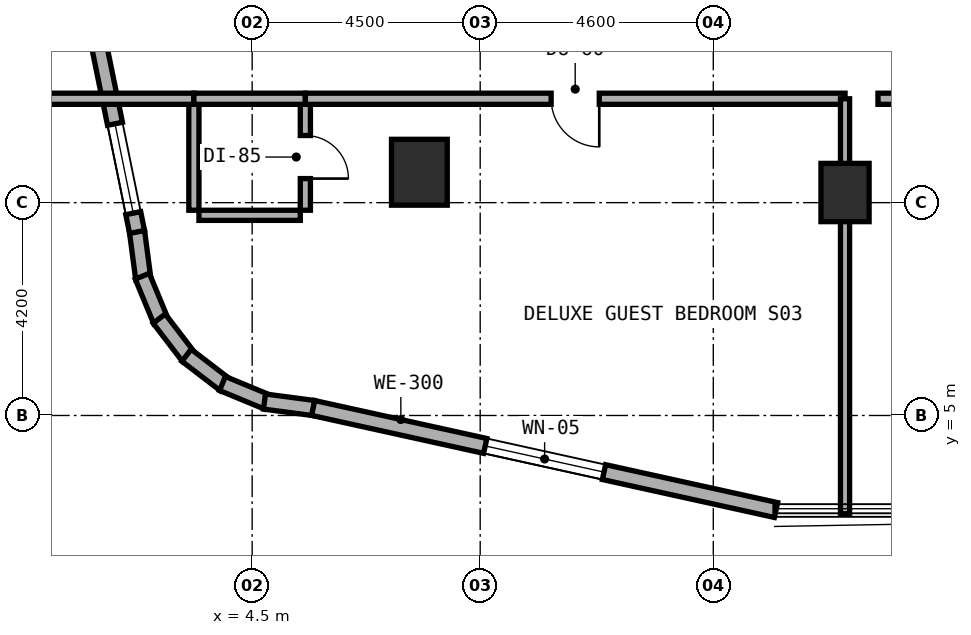
"""IFC4 building model, lengths in metres.
Left out: names, types, materials, properties, quantities, classifications, styles, units other than length and angle.
Written with IfcOpenShell. Run it as: python <this file> out.ifc"""

import sys

from ifc_helpers import new_model, si_unit, direction, frame, frame_2d, origin, origin_2d, place, context, subcontext, project, spatial, rectangle, extrude, element, fill, save


model = new_model("IFC4")
c1 = context("Model", 3, precision=1e-05, world=origin(), true_north=direction((0.0, 1.0)))
c2 = subcontext(c1, "Body", "Model", "MODEL_VIEW")
j1 = project(units=[si_unit("LENGTHUNIT", "METRE"), si_unit("PLANEANGLEUNIT", "RADIAN")], contexts=[c1])
p1 = place(None, origin())
s1 = spatial("IfcSite", under=j1, at=p1, CompositionType="ELEMENT")
p2 = place(p1, origin())
s2 = spatial("IfcBuilding", under=s1, at=p2, CompositionType="ELEMENT")
p3 = place(p2, frame((0.0, 0.0, 52.0)))
s3 = spatial("IfcBuildingStorey", under=s2, at=p3, CompositionType="ELEMENT", Elevation=52.0)
p4 = place(p3, frame((16.2, 9.4, 0.0), z_axis=(0.0, 0.0, 1.0), x_axis=(1.0, 0.0, 0.0)))
e1 = element("IfcColumn", 1, at=p4, inside=s3, PredefinedType="COLUMN", context=c2, shape_type="SweptSolid", body=[
    extrude(rectangle(XDim=0.95, YDim=1.15, at=origin_2d()), origin(), (0.0, 0.0, 1.0), 3.5),
])
p5 = place(p3, frame((7.8, 9.8, 0.0), z_axis=(0.0, 0.0, 1.0), x_axis=(1.0, 0.0, 0.0)))
e2 = element("IfcColumn", 2, at=p5, inside=s3, PredefinedType="COLUMN", context=c2, shape_type="SweptSolid", body=[
    extrude(rectangle(XDim=1.1, YDim=1.3, at=origin_2d()), origin(), (0.0, 0.0, 1.0), 3.5),
])
p6 = place(p3, frame((2.228, 8.628, 0.0), z_axis=(0.0, 0.0, 1.0), x_axis=(0.131174864804, -0.991359246108, 0.0)))
e3 = element("IfcWall", 3, at=p6, inside=s3, PredefinedType="STANDARD", context=c2, shape_type="SweptSolid", body=[
    extrude(rectangle(XDim=0.938, YDim=0.3, at=frame_2d((0.469, 0.0))), origin(), (0.0, 0.0, 1.0), 3.22),
])
p7 = place(p3, frame((2.332, 7.748, 0.0), z_axis=(0.0, 0.0, 1.0), x_axis=(0.382344263057, -0.924019948111, 0.0)))
e4 = element("IfcWall", 4, at=p7, inside=s3, PredefinedType="STANDARD", context=c2, shape_type="SweptSolid", body=[
    extrude(rectangle(XDim=0.955, YDim=0.3, at=frame_2d((0.477, 0.0))), origin(), (0.0, 0.0, 1.0), 3.22),
])
for number, where, z_axis, x_axis in (
    (5, (2.666, 6.911, 0.0), (0.0, 0.0, 1.0), (0.608, -0.794, 0.0)),
    (6, (3.205, 6.188, 0.0), (0.0, 0.0, 1.0), (0.794, -0.608, 0.0)),
):
    element("IfcWall", number, at=place(p3, frame(where, z_axis=z_axis, x_axis=x_axis)), inside=s3, PredefinedType="STANDARD", context=c2, shape_type="SweptSolid", body=[
        extrude(rectangle(XDim=0.955, YDim=0.3, at=frame_2d((0.478, 0.0))), origin(), (0.0, 0.0, 1.0), 3.22),
    ])
p8 = place(p3, frame((3.914, 5.631, 0.0), z_axis=(0.0, 0.0, 1.0), x_axis=(0.923982547689, -0.382434636986, 0.0)))
e7 = element("IfcWall", 7, at=p8, inside=s3, PredefinedType="STANDARD", context=c2, shape_type="SweptSolid", body=[
    extrude(rectangle(XDim=0.954, YDim=0.3, at=frame_2d((0.477, 0.0))), origin(), (0.0, 0.0, 1.0), 3.22),
])
p9 = place(p3, frame((4.743, 5.275, 0.0), z_axis=(0.0, 0.0, 1.0), x_axis=(0.99145856342, -0.130422072598, 0.0)))
e8 = element("IfcWall", 8, at=p9, inside=s3, PredefinedType="STANDARD", context=c2, shape_type="SweptSolid", body=[
    extrude(rectangle(XDim=0.973, YDim=0.3, at=frame_2d((0.487, 0.0))), origin(), (0.0, 0.0, 1.0), 3.22),
])
p10 = place(p3, frame((5.704, 5.148, 0.0), z_axis=(0.0, 0.0, 1.0), x_axis=(0.9765437942, -0.215318875183, 0.0)))
e9 = element("IfcWall", 9, at=p10, inside=s3, PredefinedType="STANDARD", context=c2, shape_type="SweptSolid", body=[
    extrude(rectangle(XDim=9.353, YDim=0.3, at=frame_2d((4.677, 0.0))), origin(), (0.0, 0.0, 1.0), 3.22),
])
p11 = place(p10, frame((3.477, 0.0, 0.8)))
e10 = element("IfcOpeningElement", 10, at=p11, cuts=e9, PredefinedType="OPENING", context=c2, shape_type="SweptSolid", body=[
    extrude(rectangle(XDim=2.4, YDim=1.6, at=frame_2d((1.2, 0.8))), frame((0.0, 0.16, 0.0), z_axis=(0.0, -1.0, 0.0), x_axis=(1.0, 0.0, 0.0)), (0.0, 0.0, 1.0), 0.32),
])
p12 = place(p3, frame((0.216, 18.484, 0.0), z_axis=(0.0, 0.0, 1.0), x_axis=(0.199990901713, -0.979797754249, 0.0)))
e11 = element("IfcWall", 11, at=p12, inside=s3, PredefinedType="STANDARD", context=c2, shape_type="SweptSolid", body=[
    extrude(rectangle(XDim=10.065, YDim=0.3, at=frame_2d((5.033, 0.0))), origin(), (0.0, 0.0, 1.0), 3.22),
])
p13 = place(p12, frame((2.429, 0.0, 0.8)))
e12 = element("IfcOpeningElement", 12, at=p13, cuts=e11, PredefinedType="OPENING", context=c2, shape_type="SweptSolid", body=[
    extrude(rectangle(XDim=2.4, YDim=1.6, at=frame_2d((1.2, 0.8))), frame((0.0, 0.16, 0.0), z_axis=(0.0, -1.0, 0.0), x_axis=(1.0, 0.0, 0.0)), (0.0, 0.0, 1.0), 0.32),
])
p14 = place(p12, frame((7.887, 0.0, 0.85)))
e13 = element("IfcOpeningElement", 13, at=p14, cuts=e11, PredefinedType="OPENING", context=c2, shape_type="SweptSolid", body=[
    extrude(rectangle(XDim=1.8, YDim=1.5, at=frame_2d((0.9, 0.75))), frame((0.0, 0.16, 0.0), z_axis=(0.0, -1.0, 0.0), x_axis=(1.0, 0.0, 0.0)), (0.0, 0.0, 1.0), 0.32),
])
p15 = place(p3, frame((5.55, 9.05, 0.0), z_axis=(0.0, 0.0, 1.0), x_axis=(0.0, 1.0, 0.0)))
e14 = element("IfcWall", 14, at=p15, inside=s3, PredefinedType="PLUMBINGWALL", context=c2, shape_type="SweptSolid", body=[
    extrude(rectangle(XDim=2.1, YDim=0.2, at=frame_2d((1.05, 0.0))), origin(), (0.0, 0.0, 1.0), 3.22),
])
p16 = place(p15, frame((0.625, 0.0, 0.0)))
e15 = element("IfcOpeningElement", 15, at=p16, cuts=e14, PredefinedType="OPENING", context=c2, shape_type="SweptSolid", body=[
    extrude(rectangle(XDim=0.85, YDim=2.1, at=frame_2d((0.425, 1.05))), frame((0.0, 0.11, 0.0), z_axis=(0.0, -1.0, 0.0), x_axis=(1.0, 0.0, 0.0)), (0.0, 0.0, 1.0), 0.22),
])
p17 = place(p3, frame((3.45, 8.95, 0.0), z_axis=(0.0, 0.0, 1.0), x_axis=(1.0, 0.0, 0.0)))
e16 = element("IfcWall", 16, at=p17, inside=s3, PredefinedType="PLUMBINGWALL", context=c2, shape_type="SweptSolid", body=[
    extrude(rectangle(XDim=2.0, YDim=0.2, at=frame_2d((1.0, 0.0))), origin(), (0.0, 0.0, 1.0), 3.22),
])
p18 = place(p3, frame((3.35, 9.05, 0.0), z_axis=(0.0, 0.0, 1.0), x_axis=(0.0, 1.0, 0.0)))
e17 = element("IfcWall", 17, at=p18, inside=s3, PredefinedType="PLUMBINGWALL", context=c2, shape_type="SweptSolid", body=[
    extrude(rectangle(XDim=2.1, YDim=0.2, at=frame_2d((1.05, 0.0))), origin(), (0.0, 0.0, 1.0), 3.22),
])
p19 = place(p3, frame((0.24, 11.25, 0.0), z_axis=(0.0, 0.0, 1.0), x_axis=(1.0, 0.0, 0.0)))
e18 = element("IfcWall", 18, at=p19, inside=s3, PredefinedType="SOLIDWALL", context=c2, shape_type="SweptSolid", body=[
    extrude(rectangle(XDim=3.11, YDim=0.22, at=frame_2d((1.555, 0.0))), origin(), (0.0, 0.0, 1.0), 3.22),
])
p20 = place(p3, frame((3.35, 11.25, 0.0), z_axis=(0.0, 0.0, 1.0), x_axis=(1.0, 0.0, 0.0)))
e19 = element("IfcWall", 19, at=p20, inside=s3, PredefinedType="SOLIDWALL", context=c2, shape_type="SweptSolid", body=[
    extrude(rectangle(XDim=2.2, YDim=0.22, at=frame_2d((1.1, 0.0))), origin(), (0.0, 0.0, 1.0), 3.22),
])
p21 = place(p3, frame((5.55, 11.25, 0.0), z_axis=(0.0, 0.0, 1.0), x_axis=(1.0, 0.0, 0.0)))
e20 = element("IfcWall", 20, at=p21, inside=s3, PredefinedType="SOLIDWALL", context=c2, shape_type="SweptSolid", body=[
    extrude(rectangle(XDim=10.65, YDim=0.22, at=frame_2d((5.325, 0.0))), origin(), (0.0, 0.0, 1.0), 2.395),
])
p22 = place(p21, frame((4.85, 0.0, 0.0)))
e21 = element("IfcOpeningElement", 21, at=p22, cuts=e20, PredefinedType="OPENING", context=c2, shape_type="SweptSolid", body=[
    extrude(rectangle(XDim=0.95, YDim=2.1, at=frame_2d((0.475, 1.05))), frame((0.0, 0.12, 0.0), z_axis=(0.0, -1.0, 0.0), x_axis=(1.0, 0.0, 0.0)), (0.0, 0.0, 1.0), 0.24),
])
p23 = place(p3, frame((16.2, 3.06, 0.0), z_axis=(0.0, 0.0, 1.0), x_axis=(0.0, 1.0, 0.0)))
e22 = element("IfcWall", 22, at=p23, inside=s3, PredefinedType="SOLIDWALL", context=c2, shape_type="SweptSolid", body=[
    extrude(rectangle(XDim=8.19, YDim=0.18, at=frame_2d((4.095, 0.0))), origin(), (0.0, 0.0, 1.0), 2.395),
])
p24 = place(p3, frame((16.85, 11.25, 0.0), z_axis=(0.0, 0.0, 1.0), x_axis=(1.0, 0.0, 0.0)))
e23 = element("IfcWall", 23, at=p24, inside=s3, PredefinedType="SOLIDWALL", context=c2, shape_type="SweptSolid", body=[
    extrude(rectangle(XDim=3.7, YDim=0.22, at=frame_2d((1.85, 0.0))), origin(), (0.0, 0.0, 1.0), 2.745),
])
p25 = place(p24, frame((1.16, 0.0, 0.0)))
e24 = element("IfcOpeningElement", 24, at=p25, cuts=e23, PredefinedType="OPENING", context=c2, shape_type="SweptSolid", body=[
    extrude(rectangle(XDim=1.1, YDim=2.1, at=frame_2d((0.55, 1.05))), frame((0.0, 0.12, 0.0), z_axis=(0.0, -1.0, 0.0), x_axis=(1.0, 0.0, 0.0)), (0.0, 0.0, 1.0), 0.24),
])
p26 = place(p11, origin())
e25 = element("IfcWindow", 25, at=p26, inside=s3, PartitioningType="SINGLE_PANEL", PredefinedType="WINDOW", context=c2, shape_type="SweptSolid", body=[
    extrude(rectangle(XDim=2.4, YDim=1.6, at=frame_2d((1.2, 0.8))), frame((0.0, 0.03, 0.0), z_axis=(0.0, -1.0, 0.0), x_axis=(1.0, 0.0, 0.0)), (0.0, 0.0, 1.0), 0.06),
])
fill(e10, e25)
p27 = place(p14, origin())
e26 = element("IfcWindow", 26, at=p27, inside=s3, PartitioningType="SINGLE_PANEL", PredefinedType="WINDOW", context=c2, shape_type="SweptSolid", body=[
    extrude(rectangle(XDim=1.8, YDim=1.5, at=frame_2d((0.9, 0.75))), frame((0.0, 0.03, 0.0), z_axis=(0.0, -1.0, 0.0), x_axis=(1.0, 0.0, 0.0)), (0.0, 0.0, 1.0), 0.06),
])
fill(e13, e26)
p28 = place(p16, frame((0.85, 0.0, 0.0), z_axis=(0.0, 0.0, 1.0), x_axis=(-1.0, 0.0, 0.0)))
e27 = element("IfcDoor", 27, at=p28, inside=s3, OperationType="SINGLE_SWING_RIGHT", PredefinedType="DOOR", context=c2, shape_type="SweptSolid", body=[
    extrude(rectangle(XDim=0.85, YDim=2.1, at=frame_2d((0.425, 1.05))), frame((0.0, 0.025, 0.0), z_axis=(0.0, -1.0, 0.0), x_axis=(1.0, 0.0, 0.0)), (0.0, 0.0, 1.0), 0.05),
])
fill(e15, e27)
p29 = place(p22, frame((0.95, 0.0, 0.0), z_axis=(0.0, 0.0, 1.0), x_axis=(-1.0, 0.0, 0.0)))
e28 = element("IfcDoor", 28, at=p29, inside=s3, OperationType="SINGLE_SWING_LEFT", PredefinedType="DOOR", context=c2, shape_type="SweptSolid", body=[
    extrude(rectangle(XDim=0.95, YDim=2.1, at=frame_2d((0.475, 1.05))), frame((0.0, 0.025, 0.0), z_axis=(0.0, -1.0, 0.0), x_axis=(1.0, 0.0, 0.0)), (0.0, 0.0, 1.0), 0.05),
])
fill(e21, e28)
save(model, sys.argv[1])
